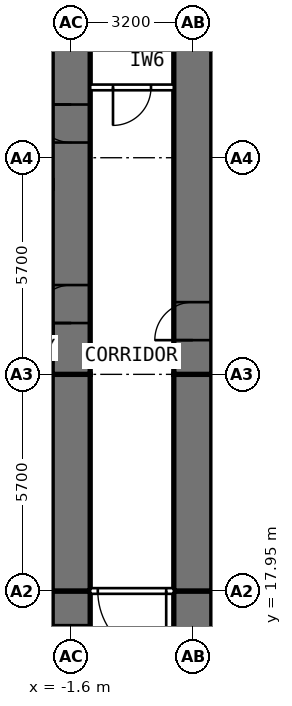
"""IFC4 building model, lengths in metres.
Left out: names, types, materials, properties, quantities, classifications, styles, units other than length and angle.
Written with IfcOpenShell. Run it as: python <this file> out.ifc"""

import sys

from ifc_helpers import new_model, si_unit, direction, frame, frame_2d, origin, place, context, subcontext, project, spatial, rectangle, extrude, element, fill, save


model = new_model("IFC4")
c1 = context("Model", 3, precision=1e-05, world=origin(), true_north=direction((0.0, 1.0)))
c2 = subcontext(c1, "Body", "Model", "MODEL_VIEW")
j1 = project(units=[si_unit("LENGTHUNIT", "METRE"), si_unit("PLANEANGLEUNIT", "RADIAN")], contexts=[c1])
p1 = place(None, origin())
s1 = spatial("IfcSite", under=j1, at=p1, CompositionType="ELEMENT")
p2 = place(p1, origin())
s2 = spatial("IfcBuilding", under=s1, at=p2, CompositionType="ELEMENT")
p3 = place(p2, frame((0.0, 0.0, 57.4)))
s3 = spatial("IfcBuildingStorey", under=s2, at=p3, CompositionType="ELEMENT", Elevation=57.4)
p4 = place(p3, frame((-1.6, 9.6, 0.0), z_axis=(0.0, 0.0, 1.0), x_axis=(0.0, 1.0, 0.0)))
e1 = element("IfcWall", 1, at=p4, inside=s3, PredefinedType="SHEAR", context=c2, shape_type="SweptSolid", body=[
    extrude(rectangle(XDim=8.35, YDim=1.0, at=frame_2d((4.175, 0.0))), origin(), (0.0, 0.0, 1.0), 3.6),
])
p5 = place(p4, frame((6.45, 0.0, 0.0)))
e2 = element("IfcOpeningElement", 2, at=p5, cuts=e1, PredefinedType="OPENING", context=c2, shape_type="SweptSolid", body=[
    extrude(rectangle(XDim=1.0, YDim=2.1, at=frame_2d((0.5, 1.05))), frame((0.0, 0.512, 0.0), z_axis=(0.0, -1.0, 0.0), x_axis=(1.0, 0.0, 0.0)), (0.0, 0.0, 1.0), 1.024),
])
p6 = place(p3, frame((-1.6, 17.95, 0.0), z_axis=(0.0, 0.0, 1.0), x_axis=(0.0, 1.0, 0.0)))
e3 = element("IfcWall", 3, at=p6, inside=s3, PredefinedType="SHEAR", context=c2, shape_type="SweptSolid", body=[
    extrude(rectangle(XDim=5.7, YDim=1.0, at=frame_2d((2.85, 0.0))), origin(), (0.0, 0.0, 1.0), 3.6),
])
p7 = place(p3, frame((-1.6, 23.65, 0.0), z_axis=(0.0, 0.0, 1.0), x_axis=(0.0, 1.0, 0.0)))
e4 = element("IfcWall", 4, at=p7, inside=s3, PredefinedType="SHEAR", context=c2, shape_type="SweptSolid", body=[
    extrude(rectangle(XDim=10.745, YDim=1.0, at=frame_2d((5.373, 0.0))), origin(), (0.0, 0.0, 1.0), 3.6),
])
p8 = place(p7, frame((6.1, 0.0, 0.0)))
e5 = element("IfcOpeningElement", 5, at=p8, cuts=e4, PredefinedType="OPENING", context=c2, shape_type="SweptSolid", body=[
    extrude(rectangle(XDim=1.0, YDim=2.1, at=frame_2d((0.5, 1.05))), frame((0.0, 0.512, 0.0), z_axis=(0.0, -1.0, 0.0), x_axis=(1.0, 0.0, 0.0)), (0.0, 0.0, 1.0), 1.024),
])
p9 = place(p7, frame((1.35, 0.0, 0.0)))
e6 = element("IfcOpeningElement", 6, at=p9, cuts=e4, PredefinedType="OPENING", context=c2, shape_type="SweptSolid", body=[
    extrude(rectangle(XDim=1.0, YDim=2.1, at=frame_2d((0.5, 1.05))), frame((0.0, 0.512, 0.0), z_axis=(0.0, -1.0, 0.0), x_axis=(1.0, 0.0, 0.0)), (0.0, 0.0, 1.0), 1.024),
])
p10 = place(p3, frame((1.6, 9.6, 0.0), z_axis=(0.0, 0.0, 1.0), x_axis=(0.0, 1.0, 0.0)))
e7 = element("IfcWall", 7, at=p10, inside=s3, PredefinedType="SHEAR", context=c2, shape_type="SweptSolid", body=[
    extrude(rectangle(XDim=8.35, YDim=1.0, at=frame_2d((4.175, 0.0))), origin(), (0.0, 0.0, 1.0), 3.6),
])
p11 = place(p10, frame((1.3, 0.0, 0.0)))
e8 = element("IfcOpeningElement", 8, at=p11, cuts=e7, PredefinedType="OPENING", context=c2, shape_type="SweptSolid", body=[
    extrude(rectangle(XDim=1.0, YDim=2.1, at=frame_2d((0.5, 1.05))), frame((0.0, 0.512, 0.0), z_axis=(0.0, -1.0, 0.0), x_axis=(1.0, 0.0, 0.0)), (0.0, 0.0, 1.0), 1.024),
])
p12 = place(p3, frame((1.6, 17.95, 0.0), z_axis=(0.0, 0.0, 1.0), x_axis=(0.0, 1.0, 0.0)))
e9 = element("IfcWall", 9, at=p12, inside=s3, PredefinedType="SHEAR", context=c2, shape_type="SweptSolid", body=[
    extrude(rectangle(XDim=5.7, YDim=1.0, at=frame_2d((2.85, 0.0))), origin(), (0.0, 0.0, 1.0), 3.6),
])
p13 = place(p3, frame((1.6, 23.65, 0.0), z_axis=(0.0, 0.0, 1.0), x_axis=(0.0, 1.0, 0.0)))
e10 = element("IfcWall", 10, at=p13, inside=s3, PredefinedType="SHEAR", context=c2, shape_type="SweptSolid", body=[
    extrude(rectangle(XDim=10.745, YDim=1.0, at=frame_2d((5.373, 0.0))), origin(), (0.0, 0.0, 1.0), 3.6),
])
p14 = place(p13, frame((0.9, 0.0, 0.0)))
e11 = element("IfcOpeningElement", 11, at=p14, cuts=e10, PredefinedType="OPENING", context=c2, shape_type="SweptSolid", body=[
    extrude(rectangle(XDim=1.0, YDim=2.1, at=frame_2d((0.5, 1.05))), frame((0.0, 0.512, 0.0), z_axis=(0.0, -1.0, 0.0), x_axis=(1.0, 0.0, 0.0)), (0.0, 0.0, 1.0), 1.024),
])
p15 = place(p3, frame((1.1, 31.2, 0.0), z_axis=(0.0, 0.0, 1.0), x_axis=(-1.0, 0.0, 0.0)))
e12 = element("IfcWall", 12, at=p15, inside=s3, PredefinedType="PARTITIONING", context=c2, shape_type="SweptSolid", body=[
    extrude(rectangle(XDim=2.2, YDim=0.15, at=frame_2d((1.1, 0.0))), origin(), (0.0, 0.0, 1.0), 3.35),
])
p16 = place(p15, frame((0.6, 0.0, 0.0)))
e13 = element("IfcOpeningElement", 13, at=p16, cuts=e12, PredefinedType="OPENING", context=c2, shape_type="SweptSolid", body=[
    extrude(rectangle(XDim=1.0, YDim=2.1, at=frame_2d((0.5, 1.05))), frame((0.0, 0.087, 0.0), z_axis=(0.0, -1.0, 0.0), x_axis=(1.0, 0.0, 0.0)), (0.0, 0.0, 1.0), 0.174),
])
p17 = place(p3, frame((1.1, 17.95, 0.0), z_axis=(0.0, 0.0, 1.0), x_axis=(-1.0, 0.0, 0.0)))
e14 = element("IfcWall", 14, at=p17, inside=s3, PredefinedType="PARTITIONING", context=c2, shape_type="SweptSolid", body=[
    extrude(rectangle(XDim=2.2, YDim=0.15, at=frame_2d((1.1, 0.0))), origin(), (0.0, 0.0, 1.0), 3.35),
])
p18 = place(p17, frame((0.2, 0.0, 0.0)))
e15 = element("IfcOpeningElement", 15, at=p18, cuts=e14, PredefinedType="OPENING", context=c2, shape_type="SweptSolid", body=[
    extrude(rectangle(XDim=1.8, YDim=2.1, at=frame_2d((0.9, 1.05))), frame((0.0, 0.087, 0.0), z_axis=(0.0, -1.0, 0.0), x_axis=(1.0, 0.0, 0.0)), (0.0, 0.0, 1.0), 0.174),
])
p19 = place(p5, origin())
e16 = element("IfcDoor", 16, at=p19, inside=s3, OperationType="SINGLE_SWING_LEFT", PredefinedType="DOOR", context=c2, shape_type="SweptSolid", body=[
    extrude(rectangle(XDim=1.0, YDim=2.1, at=frame_2d((0.5, 1.05))), frame((0.0, 0.25, 0.0), z_axis=(0.0, -1.0, 0.0), x_axis=(1.0, 0.0, 0.0)), (0.0, 0.0, 1.0), 0.5),
])
fill(e2, e16)
p20 = place(p8, origin())
e17 = element("IfcDoor", 17, at=p20, inside=s3, OperationType="SINGLE_SWING_RIGHT", PredefinedType="DOOR", context=c2, shape_type="SweptSolid", body=[
    extrude(rectangle(XDim=1.0, YDim=2.1, at=frame_2d((0.5, 1.05))), frame((0.0, 0.25, 0.0), z_axis=(0.0, -1.0, 0.0), x_axis=(1.0, 0.0, 0.0)), (0.0, 0.0, 1.0), 0.5),
])
fill(e5, e17)
p21 = place(p14, origin())
e18 = element("IfcDoor", 18, at=p21, inside=s3, OperationType="SINGLE_SWING_LEFT", PredefinedType="DOOR", context=c2, shape_type="SweptSolid", body=[
    extrude(rectangle(XDim=1.0, YDim=2.1, at=frame_2d((0.5, 1.05))), frame((0.0, 0.25, 0.0), z_axis=(0.0, -1.0, 0.0), x_axis=(1.0, 0.0, 0.0)), (0.0, 0.0, 1.0), 0.5),
])
fill(e11, e18)
p22 = place(p16, origin())
e19 = element("IfcDoor", 19, at=p22, inside=s3, OperationType="SINGLE_SWING_RIGHT", PredefinedType="DOOR", context=c2, shape_type="SweptSolid", body=[
    extrude(rectangle(XDim=1.0, YDim=2.1, at=frame_2d((0.5, 1.05))), frame((0.0, 0.025, 0.0), z_axis=(0.0, -1.0, 0.0), x_axis=(1.0, 0.0, 0.0)), (0.0, 0.0, 1.0), 0.05),
])
fill(e13, e19)
p23 = place(p18, origin())
e20 = element("IfcDoor", 20, at=p23, inside=s3, OperationType="DOUBLE_DOOR_DOUBLE_SWING", PredefinedType="DOOR", context=c2, shape_type="SweptSolid", body=[
    extrude(rectangle(XDim=1.8, YDim=2.1, at=frame_2d((0.9, 1.05))), frame((0.0, 0.025, 0.0), z_axis=(0.0, -1.0, 0.0), x_axis=(1.0, 0.0, 0.0)), (0.0, 0.0, 1.0), 0.05),
])
fill(e15, e20)
p24 = place(p9, origin())
e21 = element("IfcDoor", 21, at=p24, inside=s3, OperationType="SINGLE_SWING_LEFT", PredefinedType="DOOR", context=c2, shape_type="SweptSolid", body=[
    extrude(rectangle(XDim=1.0, YDim=2.1, at=frame_2d((0.5, 1.05))), frame((0.0, 0.25, 0.0), z_axis=(0.0, -1.0, 0.0), x_axis=(1.0, 0.0, 0.0)), (0.0, 0.0, 1.0), 0.5),
])
fill(e6, e21)
save(model, sys.argv[1])
